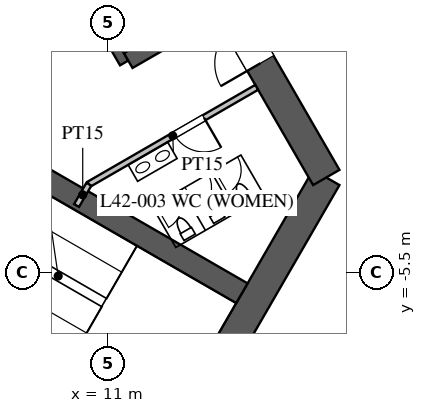
"""IFC4 building model, lengths in metres.
Left out: names, types, materials, properties, quantities, classifications, styles, units other than length and angle.
Written with IfcOpenShell. Run it as: python <this file> out.ifc"""

import sys

from ifc_helpers import new_model, si_unit, direction, frame, frame_2d, origin, place, context, subcontext, project, spatial, rectangle, extrude, element, fill, save


model = new_model("IFC4")
c1 = context("Model", 3, precision=1e-05, world=origin(), true_north=direction((0.0, 1.0)))
c2 = subcontext(c1, "Body", "Model", "MODEL_VIEW")
j1 = project(units=[si_unit("LENGTHUNIT", "METRE"), si_unit("PLANEANGLEUNIT", "RADIAN")], contexts=[c1])
p1 = place(None, origin())
s1 = spatial("IfcSite", under=j1, at=p1, CompositionType="ELEMENT")
p2 = place(p1, origin())
s2 = spatial("IfcBuilding", under=s1, at=p2, CompositionType="ELEMENT")
p3 = place(p2, frame((0.0, 0.0, 184.7)))
s3 = spatial("IfcBuildingStorey", under=s2, at=p3, CompositionType="ELEMENT", Elevation=184.7)
p4 = place(p3, frame((10.97, -13.0, 0.0), z_axis=(0.0, 0.0, 1.0), x_axis=(0.499995765644, 0.866027848477, 0.0)))
e1 = element("IfcWall", 1, at=p4, inside=s3, PredefinedType="SHEAR", context=c2, shape_type="SweptSolid", body=[
    extrude(rectangle(XDim=11.547, YDim=0.8, at=frame_2d((5.773, 0.0))), origin(), (0.0, 0.0, 1.0), 5.0),
])
p5 = place(p3, frame((16.743, -3.0, 0.0), z_axis=(0.0, 0.0, 1.0), x_axis=(-0.500002442456, 0.866023993627, 0.0)))
e2 = element("IfcWall", 2, at=p5, inside=s3, PredefinedType="SHEAR", context=c2, shape_type="SweptSolid", body=[
    extrude(rectangle(XDim=21.939, YDim=0.8, at=frame_2d((10.97, 0.0))), origin(), (0.0, 0.0, 1.0), 5.0),
])
p6 = place(p5, frame((17.27, 0.0, 0.0)))
e3 = element("IfcOpeningElement", 3, at=p6, cuts=e2, PredefinedType="OPENING", context=c2, shape_type="SweptSolid", body=[
    extrude(rectangle(XDim=1.2, YDim=2.1, at=frame_2d((0.6, 1.05))), frame((0.0, 0.41, 0.0), z_axis=(0.0, -1.0, 0.0), x_axis=(1.0, 0.0, 0.0)), (0.0, 0.0, 1.0), 0.82),
])
p7 = place(p5, frame((3.47, 0.0, 0.0)))
e4 = element("IfcOpeningElement", 4, at=p7, cuts=e2, PredefinedType="OPENING", context=c2, shape_type="SweptSolid", body=[
    extrude(rectangle(XDim=1.2, YDim=2.1, at=frame_2d((0.6, 1.05))), frame((0.0, 0.41, 0.0), z_axis=(0.0, -1.0, 0.0), x_axis=(1.0, 0.0, 0.0)), (0.0, 0.0, 1.0), 0.82),
])
p8 = place(p3, frame((11.424, 0.014, 0.0), z_axis=(0.0, 0.0, 1.0), x_axis=(-0.500001763848, 0.866024385424, 0.0)))
e5 = element("IfcWall", 5, at=p8, inside=s3, PredefinedType="SHEAR", context=c2, shape_type="SweptSolid", body=[
    extrude(rectangle(XDim=11.4, YDim=0.25, at=frame_2d((5.7, 0.0))), origin(), (0.0, 0.0, 1.0), 5.0),
])
p9 = place(p8, frame((0.975, 0.0, 0.0)))
e6 = element("IfcOpeningElement", 6, at=p9, cuts=e5, PredefinedType="OPENING", context=c2, shape_type="SweptSolid", body=[
    extrude(rectangle(XDim=0.9, YDim=2.1, at=frame_2d((0.45, 1.05))), frame((0.0, 0.135, 0.0), z_axis=(0.0, -1.0, 0.0), x_axis=(1.0, 0.0, 0.0)), (0.0, 0.0, 1.0), 0.27),
])
p10 = place(p8, frame((3.825, 0.0, 0.0)))
e7 = element("IfcOpeningElement", 7, at=p10, cuts=e5, PredefinedType="OPENING", context=c2, shape_type="SweptSolid", body=[
    extrude(rectangle(XDim=0.9, YDim=2.1, at=frame_2d((0.45, 1.05))), frame((0.0, 0.135, 0.0), z_axis=(0.0, -1.0, 0.0), x_axis=(1.0, 0.0, 0.0)), (0.0, 0.0, 1.0), 0.27),
])
p11 = place(p8, frame((6.575, 0.0, 0.0)))
e8 = element("IfcOpeningElement", 8, at=p11, cuts=e5, PredefinedType="OPENING", context=c2, shape_type="SweptSolid", body=[
    extrude(rectangle(XDim=1.1, YDim=2.2, at=frame_2d((0.55, 1.1))), frame((0.0, 0.135, 0.0), z_axis=(0.0, -1.0, 0.0), x_axis=(1.0, 0.0, 0.0)), (0.0, 0.0, 1.0), 0.27),
])
p12 = place(p8, frame((9.425, 0.0, 0.0)))
e9 = element("IfcOpeningElement", 9, at=p12, cuts=e5, PredefinedType="OPENING", context=c2, shape_type="SweptSolid", body=[
    extrude(rectangle(XDim=1.1, YDim=2.2, at=frame_2d((0.55, 1.1))), frame((0.0, 0.135, 0.0), z_axis=(0.0, -1.0, 0.0), x_axis=(1.0, 0.0, 0.0)), (0.0, 0.0, 1.0), 0.27),
])
p13 = place(p3, frame((11.532, 0.076, 0.0), z_axis=(0.0, 0.0, 1.0), x_axis=(0.866005588531, 0.500034319456, 0.0)))
e10 = element("IfcWall", 10, at=p13, inside=s3, PredefinedType="SHEAR", context=c2, shape_type="SweptSolid", body=[
    extrude(rectangle(XDim=2.575, YDim=0.45, at=frame_2d((1.288, 0.0))), origin(), (0.0, 0.0, 1.0), 5.0),
])
for number, where, z_axis, x_axis in (
    (11, (4.638, -5.016, 0.0), (0.0, 0.0, 1.0), (0.866, -0.5, 0.0)),
    (12, (6.663, -1.509, 0.0), (0.0, 0.0, 1.0), (0.866, -0.5, 0.0)),
):
    element("IfcWall", number, at=place(p3, frame(where, z_axis=z_axis, x_axis=x_axis)), inside=s3, PredefinedType="SHEAR", context=c2, shape_type="SweptSolid", body=[
        extrude(rectangle(XDim=9.075, YDim=0.6, at=frame_2d((4.538, 0.0))), origin(), (0.0, 0.0, 1.0), 5.0),
    ])
p14 = place(p3, frame((10.495, -3.178, 0.0), z_axis=(0.0, 0.0, 1.0), x_axis=(0.86602216432, 0.500005610874, 0.0)))
e13 = element("IfcWall", 13, at=p14, inside=s3, PredefinedType="PARTITIONING", context=c2, shape_type="SweptSolid", body=[
    extrude(rectangle(XDim=5.1, YDim=0.15, at=frame_2d((2.55, 0.0))), origin(), (0.0, 0.0, 1.0), 4.8),
])
p15 = place(p14, frame((2.6, 0.0, 0.0)))
e14 = element("IfcOpeningElement", 14, at=p15, cuts=e13, PredefinedType="OPENING", context=c2, shape_type="SweptSolid", body=[
    extrude(rectangle(XDim=0.9, YDim=2.1, at=frame_2d((0.45, 1.05))), frame((0.0, 0.085, 0.0), z_axis=(0.0, -1.0, 0.0), x_axis=(1.0, 0.0, 0.0)), (0.0, 0.0, 1.0), 0.17),
])
p16 = place(p3, frame((10.495, -3.178, 0.0), z_axis=(0.0, 0.0, 1.0), x_axis=(-0.499842556608, -0.866116284689, 0.0)))
e15 = element("IfcWall", 15, at=p16, inside=s3, PredefinedType="PARTITIONING", context=c2, shape_type="SweptSolid", body=[
    extrude(rectangle(XDim=0.645, YDim=0.15, at=frame_2d((0.323, 0.0))), origin(), (0.0, 0.0, 1.0), 4.8),
])
p17 = place(p15, frame((0.9, 0.0, 0.0), z_axis=(0.0, 0.0, 1.0), x_axis=(-1.0, 0.0, 0.0)))
e16 = element("IfcDoor", 16, at=p17, inside=s3, OperationType="SINGLE_SWING_LEFT", PredefinedType="DOOR", context=c2, shape_type="SweptSolid", body=[
    extrude(rectangle(XDim=0.9, YDim=2.1, at=frame_2d((0.45, 1.05))), frame((0.0, 0.025, 0.0), z_axis=(0.0, -1.0, 0.0), x_axis=(1.0, 0.0, 0.0)), (0.0, 0.0, 1.0), 0.05),
])
fill(e14, e16)
p18 = place(p7, origin())
e17 = element("IfcDoor", 17, at=p18, inside=s3, OperationType="SINGLE_SWING_LEFT", PredefinedType="DOOR", context=c2, shape_type="SweptSolid", body=[
    extrude(rectangle(XDim=1.2, YDim=2.1, at=frame_2d((0.6, 1.05))), frame((0.0, 0.025, 0.0), z_axis=(0.0, -1.0, 0.0), x_axis=(1.0, 0.0, 0.0)), (0.0, 0.0, 1.0), 0.05),
])
fill(e4, e17)
save(model, sys.argv[1])
